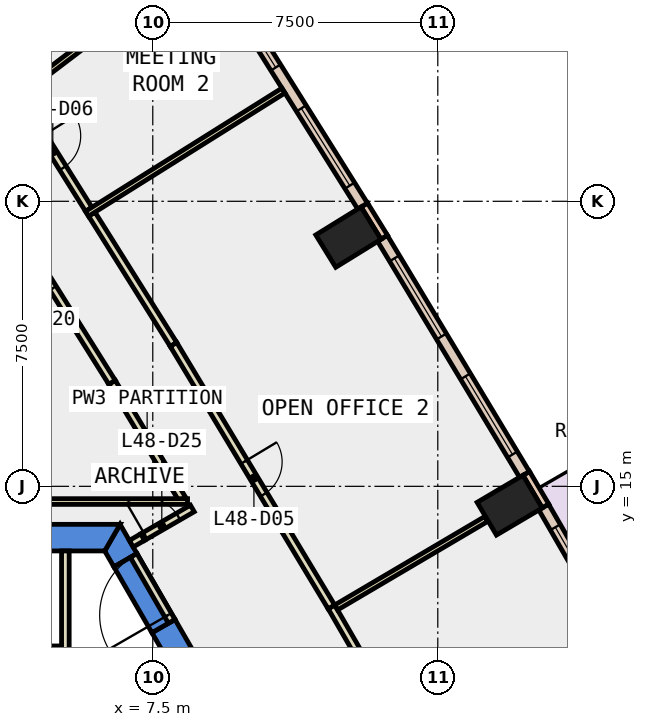
"""IFC4 building model, lengths in metres.
Left out: names, types, materials, properties, quantities, classifications, styles, units other than length and angle.
Written with IfcOpenShell. Run it as: python <this file> out.ifc"""

import sys

from ifc_helpers import new_model, si_unit, direction, frame, frame_2d, origin, origin_2d, place, context, subcontext, project, spatial, polyline, rectangle, outline, extrude, element, fill, save


model = new_model("IFC4")
c1 = context("Model", 3, precision=1e-05, world=origin(), true_north=direction((0.0, 1.0)))
c2 = subcontext(c1, "Body", "Model", "MODEL_VIEW")
j1 = project(units=[si_unit("LENGTHUNIT", "METRE"), si_unit("PLANEANGLEUNIT", "RADIAN")], contexts=[c1])
p1 = place(None, origin())
s1 = spatial("IfcSite", under=j1, at=p1, CompositionType="ELEMENT")
p2 = place(p1, origin())
s2 = spatial("IfcBuilding", under=s1, at=p2, CompositionType="ELEMENT")
p3 = place(p2, frame((0.0, 0.0, 215.0)))
s3 = spatial("IfcBuildingStorey", under=s2, at=p3, CompositionType="ELEMENT", Elevation=215.0)
for number, where, z_axis, x_axis in (
    (1, (16.892, 14.504, -0.4), (0.0, 0.0, 1.0), (-0.509, 0.861, 0.0)),
    (2, (12.648, 21.557, -0.4), (0.0, 0.0, 1.0), (-0.525, 0.851, 0.0)),
):
    element("IfcColumn", number, at=place(p3, frame(where, z_axis=z_axis, x_axis=x_axis)), inside=s3, PredefinedType="COLUMN", context=c2, shape_type="SweptSolid", body=[
        extrude(rectangle(XDim=1.0, YDim=1.4, at=origin_2d()), origin(), (0.0, 0.0, 1.0), 4.2),
    ])
p4 = place(p3, frame((0.0, 0.0, -0.4)))
e3 = element("IfcWall", 3, at=p4, inside=s3, PredefinedType="SHEAR", context=c2, shape_type="SweptSolid", body=[
    extrude(outline(polyline([(8.084, 11.498), (7.478, 11.148), (12.471, 2.5), (13.279, 2.5), (8.084, 11.498)])), origin(), (0.0, 0.0, 1.0), 4.2),
])
p5 = place(p3, frame((0.0, 0.0, -0.4)))
e4 = element("IfcWall", 4, at=p5, inside=s3, PredefinedType="SHEAR", context=c2, shape_type="SweptSolid", body=[
    extrude(outline(polyline([(6.478, 12.88), (7.084, 13.23), (6.64, 14.0), (6.235, 13.3), (6.478, 12.88)])), origin(), (0.0, 0.0, 1.0), 4.2),
])
p6 = place(p3, frame((0.0, 0.0, 3.6)))
e5 = element("IfcWall", 5, at=p6, inside=s3, PredefinedType="SHEAR", context=c2, shape_type="SweptSolid", body=[
    extrude(outline(polyline([(7.084, 13.23), (6.478, 12.88), (7.478, 11.148), (8.084, 11.498), (7.084, 13.23)])), origin(), (0.0, 0.0, 1.0), 0.2),
])
p7 = place(p3, frame((0.0, 0.0, -0.4)))
e6 = element("IfcWall", 6, at=p7, inside=s3, PredefinedType="SHEAR", context=c2, shape_type="SweptSolid", body=[
    extrude(outline(polyline([(6.64, 14.0), (-6.64, 14.0), (-6.235, 13.3), (6.235, 13.3), (6.64, 14.0)])), origin(), (0.0, 0.0, 1.0), 4.2),
])
p8 = place(p3, frame((17.835, 14.481, 0.0), z_axis=(0.0, 0.0, 1.0), x_axis=(-0.508161541526, 0.861261776531, 0.0)))
e7 = element("IfcWall", 7, at=p8, inside=s3, PredefinedType="STANDARD", context=c2, shape_type="SweptSolid", body=[
    extrude(rectangle(XDim=1.0, YDim=0.2, at=frame_2d((0.5, 0.0))), origin(), (0.0, 0.0, 1.0), 3.8),
])
p9 = place(p3, frame((13.592, 21.552, 0.0), z_axis=(0.0, 0.0, 1.0), x_axis=(-0.525825307325, 0.850592585306, 0.0)))
e8 = element("IfcWall", 8, at=p9, inside=s3, PredefinedType="STANDARD", context=c2, shape_type="SweptSolid", body=[
    extrude(rectangle(XDim=1.0, YDim=0.2, at=frame_2d((0.5, 0.0))), origin(), (0.0, 0.0, 1.0), 3.8),
])
p10 = place(p3, frame((21.411, 8.177, 0.0), z_axis=(0.0, 0.0, 1.0), x_axis=(-0.499968351115, 0.866043675505, 0.0)))
e9 = element("IfcWall", 9, at=p10, inside=s3, PredefinedType="STANDARD", context=c2, shape_type="SweptSolid", body=[
    extrude(rectangle(XDim=7.248, YDim=0.3, at=frame_2d((3.624, 0.0))), origin(), (0.0, 0.0, 1.0), 3.8),
])
p11 = place(p10, frame((0.812, 0.0, 0.0)))
e10 = element("IfcOpeningElement", 10, at=p11, cuts=e9, PredefinedType="OPENING", context=c2, shape_type="SweptSolid", body=[
    extrude(rectangle(XDim=2.0, YDim=2.4, at=frame_2d((1.0, 1.2))), frame((0.0, 0.16, 0.0), z_axis=(0.0, -1.0, 0.0), x_axis=(1.0, 0.0, 0.0)), (0.0, 0.0, 1.0), 0.32),
])
p12 = place(p10, frame((4.236, 0.0, 0.9)))
e11 = element("IfcOpeningElement", 11, at=p12, cuts=e9, PredefinedType="OPENING", context=c2, shape_type="SweptSolid", body=[
    extrude(rectangle(XDim=2.4, YDim=2.6, at=frame_2d((1.2, 1.3))), frame((0.0, 0.16, 0.0), z_axis=(0.0, -1.0, 0.0), x_axis=(1.0, 0.0, 0.0)), (0.0, 0.0, 1.0), 0.32),
])
p13 = place(p3, frame((17.281, 15.313, 0.0), z_axis=(0.0, 0.0, 1.0), x_axis=(-0.515560283412, 0.856853309597, 0.0)))
e12 = element("IfcWall", 12, at=p13, inside=s3, PredefinedType="STANDARD", context=c2, shape_type="SweptSolid", body=[
    extrude(rectangle(XDim=7.249, YDim=0.3, at=frame_2d((3.624, 0.0))), origin(), (0.0, 0.0, 1.0), 3.8),
])
p14 = place(p13, frame((0.612, 0.0, 0.9)))
e13 = element("IfcOpeningElement", 13, at=p14, cuts=e12, PredefinedType="OPENING", context=c2, shape_type="SweptSolid", body=[
    extrude(rectangle(XDim=2.4, YDim=2.6, at=frame_2d((1.2, 1.3))), frame((0.0, 0.16, 0.0), z_axis=(0.0, -1.0, 0.0), x_axis=(1.0, 0.0, 0.0)), (0.0, 0.0, 1.0), 0.32),
])
p15 = place(p13, frame((4.236, 0.0, 0.9)))
e14 = element("IfcOpeningElement", 14, at=p15, cuts=e12, PredefinedType="OPENING", context=c2, shape_type="SweptSolid", body=[
    extrude(rectangle(XDim=2.4, YDim=2.6, at=frame_2d((1.2, 1.3))), frame((0.0, 0.16, 0.0), z_axis=(0.0, -1.0, 0.0), x_axis=(1.0, 0.0, 0.0)), (0.0, 0.0, 1.0), 0.32),
])
p16 = place(p3, frame((13.021, 22.374, 0.0), z_axis=(0.0, 0.0, 1.0), x_axis=(-0.531239262679, 0.847221839773, 0.0)))
e15 = element("IfcWall", 15, at=p16, inside=s3, PredefinedType="STANDARD", context=c2, shape_type="SweptSolid", body=[
    extrude(rectangle(XDim=7.339, YDim=0.3, at=frame_2d((3.67, 0.0))), origin(), (0.0, 0.0, 1.0), 3.8),
])
p17 = place(p16, frame((0.635, 0.0, 0.9)))
e16 = element("IfcOpeningElement", 16, at=p17, cuts=e15, PredefinedType="OPENING", context=c2, shape_type="SweptSolid", body=[
    extrude(rectangle(XDim=2.4, YDim=2.6, at=frame_2d((1.2, 1.3))), frame((0.0, 0.16, 0.0), z_axis=(0.0, -1.0, 0.0), x_axis=(1.0, 0.0, 0.0)), (0.0, 0.0, 1.0), 0.32),
])
p18 = place(p16, frame((4.304, 0.0, 0.9)))
e17 = element("IfcOpeningElement", 17, at=p18, cuts=e15, PredefinedType="OPENING", context=c2, shape_type="SweptSolid", body=[
    extrude(rectangle(XDim=2.4, YDim=2.6, at=frame_2d((1.2, 1.3))), frame((0.0, 0.16, 0.0), z_axis=(0.0, -1.0, 0.0), x_axis=(1.0, 0.0, 0.0)), (0.0, 0.0, 1.0), 0.32),
])
p19 = place(p3, frame((6.934, 13.49, 0.0), z_axis=(0.0, 0.0, 1.0), x_axis=(0.865871789474, 0.500265973451, 0.0)))
e18 = element("IfcWall", 18, at=p19, inside=s3, PredefinedType="PARTITIONING", context=c2, shape_type="SweptSolid", body=[
    extrude(rectangle(XDim=0.35, YDim=0.2, at=frame_2d((0.175, 0.0))), origin(), (0.0, 0.0, 1.0), 2.4),
])
p20 = place(p3, frame((8.276, 14.664, 0.0), z_axis=(0.0, 0.0, 1.0), x_axis=(-0.515416266777, 0.85693994652, 0.0)))
e19 = element("IfcWall", 19, at=p20, inside=s3, PredefinedType="PARTITIONING", context=c2, shape_type="SweptSolid", body=[
    extrude(rectangle(XDim=3.587, YDim=0.2, at=frame_2d((1.793, 0.0))), origin(), (0.0, 0.0, 1.0), 3.8),
])
p21 = place(p3, frame((6.427, 17.738, 0.0), z_axis=(0.0, 0.0, 1.0), x_axis=(-0.531335643981, 0.847161397512, 0.0)))
e20 = element("IfcWall", 20, at=p21, inside=s3, PredefinedType="PARTITIONING", context=c2, shape_type="SweptSolid", body=[
    extrude(rectangle(XDim=7.647, YDim=0.2, at=frame_2d((3.823, 0.0))), origin(), (0.0, 0.0, 1.0), 3.8),
])
p22 = place(p21, frame((2.923, 0.0, 0.0)))
e21 = element("IfcOpeningElement", 21, at=p22, cuts=e20, PredefinedType="OPENING", context=c2, shape_type="SweptSolid", body=[
    extrude(rectangle(XDim=1.8, YDim=2.1, at=frame_2d((0.9, 1.05))), frame((0.0, 0.11, 0.0), z_axis=(0.0, -1.0, 0.0), x_axis=(1.0, 0.0, 0.0)), (0.0, 0.0, 1.0), 0.22),
])
p23 = place(p3, frame((12.202, 11.828, 0.0), z_axis=(0.0, 0.0, 1.0), x_axis=(0.499919823193, -0.866071688937, 0.0)))
e22 = element("IfcWall", 22, at=p23, inside=s3, PredefinedType="PARTITIONING", context=c2, shape_type="SweptSolid", body=[
    extrude(rectangle(XDim=8.209, YDim=0.2, at=frame_2d((4.104, 0.0))), origin(), (0.0, 0.0, 1.0), 3.8),
])
p24 = place(p23, frame((3.604, 0.0, 0.0)))
e23 = element("IfcOpeningElement", 23, at=p24, cuts=e22, PredefinedType="OPENING", context=c2, shape_type="SweptSolid", body=[
    extrude(rectangle(XDim=1.0, YDim=2.1, at=frame_2d((0.5, 1.05))), frame((0.0, 0.11, 0.0), z_axis=(0.0, -1.0, 0.0), x_axis=(1.0, 0.0, 0.0)), (0.0, 0.0, 1.0), 0.22),
])
p25 = place(p3, frame((5.895, 22.162, 0.0), z_axis=(0.0, 0.0, 1.0), x_axis=(0.531245023709, -0.847218227368, 0.0)))
e24 = element("IfcWall", 24, at=p25, inside=s3, PredefinedType="PARTITIONING", context=c2, shape_type="SweptSolid", body=[
    extrude(rectangle(XDim=4.049, YDim=0.2, at=frame_2d((2.024, 0.0))), origin(), (0.0, 0.0, 1.0), 3.8),
])
p26 = place(p3, frame((8.046, 18.732, 0.0), z_axis=(0.0, 0.0, 1.0), x_axis=(0.515502328211, -0.856888178007, 0.0)))
e25 = element("IfcWall", 25, at=p26, inside=s3, PredefinedType="PARTITIONING", context=c2, shape_type="SweptSolid", body=[
    extrude(rectangle(XDim=8.058, YDim=0.2, at=frame_2d((4.029, 0.0))), origin(), (0.0, 0.0, 1.0), 3.8),
])
p27 = place(p26, frame((3.604, 0.0, 0.0)))
e26 = element("IfcOpeningElement", 26, at=p27, cuts=e25, PredefinedType="OPENING", context=c2, shape_type="SweptSolid", body=[
    extrude(rectangle(XDim=1.0, YDim=2.1, at=frame_2d((0.5, 1.05))), frame((0.0, 0.11, 0.0), z_axis=(0.0, -1.0, 0.0), x_axis=(1.0, 0.0, 0.0)), (0.0, 0.0, 1.0), 0.22),
])
p28 = place(p3, frame((3.923, 25.307, 0.0), z_axis=(0.0, 0.0, 1.0), x_axis=(0.531150612982, -0.847277419934, 0.0)))
e27 = element("IfcWall", 27, at=p28, inside=s3, PredefinedType="PARTITIONING", context=c2, shape_type="SweptSolid", body=[
    extrude(rectangle(XDim=3.562, YDim=0.2, at=frame_2d((1.781, 0.0))), origin(), (0.0, 0.0, 1.0), 3.8),
])
p29 = place(p28, frame((1.281, 0.0, 0.0)))
e28 = element("IfcOpeningElement", 28, at=p29, cuts=e27, PredefinedType="OPENING", context=c2, shape_type="SweptSolid", body=[
    extrude(rectangle(XDim=1.0, YDim=2.1, at=frame_2d((0.5, 1.05))), frame((0.0, 0.11, 0.0), z_axis=(0.0, -1.0, 0.0), x_axis=(1.0, 0.0, 0.0)), (0.0, 0.0, 1.0), 0.22),
])
p30 = place(p3, frame((5.2, 13.3, 0.0), z_axis=(0.0, 0.0, 1.0), x_axis=(0.0, -1.0, 0.0)))
e29 = element("IfcWall", 29, at=p30, inside=s3, PredefinedType="PARTITIONING", context=c2, shape_type="SweptSolid", body=[
    extrude(rectangle(XDim=2.7, YDim=0.2, at=frame_2d((1.35, 0.0))), origin(), (0.0, 0.0, 1.0), 3.8),
])
p31 = place(p3, frame((5.1, 10.7, 0.0), z_axis=(0.0, 0.0, 1.0), x_axis=(-1.0, 0.0, 0.0)))
e30 = element("IfcWall", 30, at=p31, inside=s3, PredefinedType="PARTITIONING", context=c2, shape_type="SweptSolid", body=[
    extrude(rectangle(XDim=2.4, YDim=0.2, at=frame_2d((1.2, 0.0))), origin(), (0.0, 0.0, 1.0), 3.8),
])
p32 = place(p31, frame((0.75, 0.0, 0.0)))
e31 = element("IfcOpeningElement", 31, at=p32, cuts=e30, PredefinedType="OPENING", context=c2, shape_type="SweptSolid", body=[
    extrude(rectangle(XDim=0.9, YDim=2.1, at=frame_2d((0.45, 1.05))), frame((0.0, 0.11, 0.0), z_axis=(0.0, -1.0, 0.0), x_axis=(1.0, 0.0, 0.0)), (0.0, 0.0, 1.0), 0.22),
])
p33 = place(p3, frame((8.415, 14.6, 0.0), z_axis=(0.0, 0.0, 1.0), x_axis=(-1.0, 0.0, 0.0)))
e32 = element("IfcWall", 32, at=p33, inside=s3, PredefinedType="PARTITIONING", context=c2, shape_type="SweptSolid", body=[
    extrude(rectangle(XDim=8.015, YDim=0.15, at=frame_2d((4.008, 0.0))), origin(), (0.0, 0.0, 1.0), 3.8),
])
p34 = place(p3, frame((12.326, 11.813, 0.0), z_axis=(0.0, 0.0, 1.0), x_axis=(0.861428100003, 0.507879541353, 0.0)))
e33 = element("IfcWall", 33, at=p34, inside=s3, PredefinedType="PARTITIONING", context=c2, shape_type="SweptSolid", body=[
    extrude(rectangle(XDim=4.58, YDim=0.15, at=frame_2d((2.29, 0.0))), origin(), (0.0, 0.0, 1.0), 3.8),
])
p35 = place(p3, frame((5.77, 22.172, 0.0), z_axis=(0.0, 0.0, 1.0), x_axis=(0.847187879248, 0.531293419171, 0.0)))
e34 = element("IfcWall", 34, at=p35, inside=s3, PredefinedType="PARTITIONING", context=c2, shape_type="SweptSolid", body=[
    extrude(rectangle(XDim=6.1, YDim=0.15, at=frame_2d((3.05, 0.0))), origin(), (0.0, 0.0, 1.0), 3.8),
])
p36 = place(p3, frame((3.856, 25.225, 0.0), z_axis=(0.0, 0.0, 1.0), x_axis=(0.795987848728, 0.605312600792, 0.0)))
e35 = element("IfcWall", 35, at=p36, inside=s3, PredefinedType="PARTITIONING", context=c2, shape_type="SweptSolid", body=[
    extrude(rectangle(XDim=4.804, YDim=0.15, at=frame_2d((2.402, 0.0))), origin(), (0.0, 0.0, 1.0), 3.8),
])
p37 = place(p3, frame((7.997, 11.448, 0.0), z_axis=(0.0, 0.0, 1.0), x_axis=(-0.50002537861, 0.866010750942, 0.0)))
e36 = element("IfcWall", 36, at=p37, inside=s3, PredefinedType="PARTITIONING", context=c2, shape_type="SweptSolid", body=[
    extrude(rectangle(XDim=2.0, YDim=0.2, at=frame_2d((1.0, 0.0))), origin(), (0.0, 0.0, 1.0), 2.4),
])
p38 = place(p37, frame((0.19, 0.0, 0.0)))
e37 = element("IfcOpeningElement", 37, at=p38, cuts=e36, PredefinedType="OPENING", context=c2, shape_type="SweptSolid", body=[
    extrude(rectangle(XDim=1.8, YDim=2.1, at=frame_2d((0.9, 1.05))), frame((0.0, 0.11, 0.0), z_axis=(0.0, -1.0, 0.0), x_axis=(1.0, 0.0, 0.0)), (0.0, 0.0, 1.0), 0.22),
])
p39 = place(p3, frame((7.237, 13.665, 0.0), z_axis=(0.0, 0.0, 1.0), x_axis=(0.865999269783, 0.500045262687, 0.0)))
e38 = element("IfcWall", 38, at=p39, inside=s3, PredefinedType="PARTITIONING", context=c2, shape_type="SweptSolid", body=[
    extrude(rectangle(XDim=1.506, YDim=0.2, at=frame_2d((0.753, 0.0))), origin(), (0.0, 0.0, 1.0), 3.8),
])
p40 = place(p39, frame((0.078, 0.0, 0.0)))
e39 = element("IfcOpeningElement", 39, at=p40, cuts=e38, PredefinedType="OPENING", context=c2, shape_type="SweptSolid", body=[
    extrude(rectangle(XDim=1.0, YDim=2.1, at=frame_2d((0.5, 1.05))), frame((0.0, 0.11, 0.0), z_axis=(0.0, -1.0, 0.0), x_axis=(1.0, 0.0, 0.0)), (0.0, 0.0, 1.0), 0.22),
])
p41 = place(p12, origin())
e40 = element("IfcWindow", 40, at=p41, inside=s3, PartitioningType="SINGLE_PANEL", PredefinedType="WINDOW", context=c2, shape_type="SweptSolid", body=[
    extrude(rectangle(XDim=2.4, YDim=2.6, at=frame_2d((1.2, 1.3))), frame((0.0, 0.03, 0.0), z_axis=(0.0, -1.0, 0.0), x_axis=(1.0, 0.0, 0.0)), (0.0, 0.0, 1.0), 0.06),
])
fill(e11, e40)
p42 = place(p14, origin())
e41 = element("IfcWindow", 41, at=p42, inside=s3, PartitioningType="SINGLE_PANEL", PredefinedType="WINDOW", context=c2, shape_type="SweptSolid", body=[
    extrude(rectangle(XDim=2.4, YDim=2.6, at=frame_2d((1.2, 1.3))), frame((0.0, 0.03, 0.0), z_axis=(0.0, -1.0, 0.0), x_axis=(1.0, 0.0, 0.0)), (0.0, 0.0, 1.0), 0.06),
])
fill(e13, e41)
p43 = place(p15, origin())
e42 = element("IfcWindow", 42, at=p43, inside=s3, PartitioningType="SINGLE_PANEL", PredefinedType="WINDOW", context=c2, shape_type="SweptSolid", body=[
    extrude(rectangle(XDim=2.4, YDim=2.6, at=frame_2d((1.2, 1.3))), frame((0.0, 0.03, 0.0), z_axis=(0.0, -1.0, 0.0), x_axis=(1.0, 0.0, 0.0)), (0.0, 0.0, 1.0), 0.06),
])
fill(e14, e42)
p44 = place(p17, origin())
e43 = element("IfcWindow", 43, at=p44, inside=s3, PartitioningType="SINGLE_PANEL", PredefinedType="WINDOW", context=c2, shape_type="SweptSolid", body=[
    extrude(rectangle(XDim=2.4, YDim=2.6, at=frame_2d((1.2, 1.3))), frame((0.0, 0.03, 0.0), z_axis=(0.0, -1.0, 0.0), x_axis=(1.0, 0.0, 0.0)), (0.0, 0.0, 1.0), 0.06),
])
fill(e16, e43)
p45 = place(p18, origin())
e44 = element("IfcWindow", 44, at=p45, inside=s3, PartitioningType="SINGLE_PANEL", PredefinedType="WINDOW", context=c2, shape_type="SweptSolid", body=[
    extrude(rectangle(XDim=2.4, YDim=2.6, at=frame_2d((1.2, 1.3))), frame((0.0, 0.03, 0.0), z_axis=(0.0, -1.0, 0.0), x_axis=(1.0, 0.0, 0.0)), (0.0, 0.0, 1.0), 0.06),
])
fill(e17, e44)
p46 = place(p27, origin())
e45 = element("IfcDoor", 45, at=p46, inside=s3, OperationType="SINGLE_SWING_RIGHT", PredefinedType="DOOR", context=c2, shape_type="SweptSolid", body=[
    extrude(rectangle(XDim=1.0, YDim=2.1, at=frame_2d((0.5, 1.05))), frame((0.0, 0.025, 0.0), z_axis=(0.0, -1.0, 0.0), x_axis=(1.0, 0.0, 0.0)), (0.0, 0.0, 1.0), 0.05),
])
fill(e26, e45)
p47 = place(p29, origin())
e46 = element("IfcDoor", 46, at=p47, inside=s3, OperationType="SINGLE_SWING_LEFT", PredefinedType="DOOR", context=c2, shape_type="SweptSolid", body=[
    extrude(rectangle(XDim=1.0, YDim=2.1, at=frame_2d((0.5, 1.05))), frame((0.0, 0.025, 0.0), z_axis=(0.0, -1.0, 0.0), x_axis=(1.0, 0.0, 0.0)), (0.0, 0.0, 1.0), 0.05),
])
fill(e28, e46)
p48 = place(p22, origin())
e47 = element("IfcDoor", 47, at=p48, inside=s3, OperationType="DOUBLE_DOOR_SINGLE_SWING", PredefinedType="DOOR", context=c2, shape_type="SweptSolid", body=[
    extrude(rectangle(XDim=1.8, YDim=2.1, at=frame_2d((0.9, 1.05))), frame((0.0, 0.025, 0.0), z_axis=(0.0, -1.0, 0.0), x_axis=(1.0, 0.0, 0.0)), (0.0, 0.0, 1.0), 0.05),
])
fill(e21, e47)
p49 = place(p40, origin())
e48 = element("IfcDoor", 48, at=p49, inside=s3, OperationType="SINGLE_SWING_LEFT", PredefinedType="DOOR", context=c2, shape_type="SweptSolid", body=[
    extrude(rectangle(XDim=1.0, YDim=2.1, at=frame_2d((0.5, 1.05))), frame((0.0, 0.025, 0.0), z_axis=(0.0, -1.0, 0.0), x_axis=(1.0, 0.0, 0.0)), (0.0, 0.0, 1.0), 0.05),
])
fill(e39, e48)
p50 = place(p38, origin())
e49 = element("IfcDoor", 49, at=p50, inside=s3, OperationType="DOUBLE_DOOR_SINGLE_SWING", PredefinedType="DOOR", context=c2, shape_type="SweptSolid", body=[
    extrude(rectangle(XDim=1.8, YDim=2.1, at=frame_2d((0.9, 1.05))), frame((0.0, 0.025, 0.0), z_axis=(0.0, -1.0, 0.0), x_axis=(1.0, 0.0, 0.0)), (0.0, 0.0, 1.0), 0.05),
])
fill(e37, e49)
save(model, sys.argv[1])
